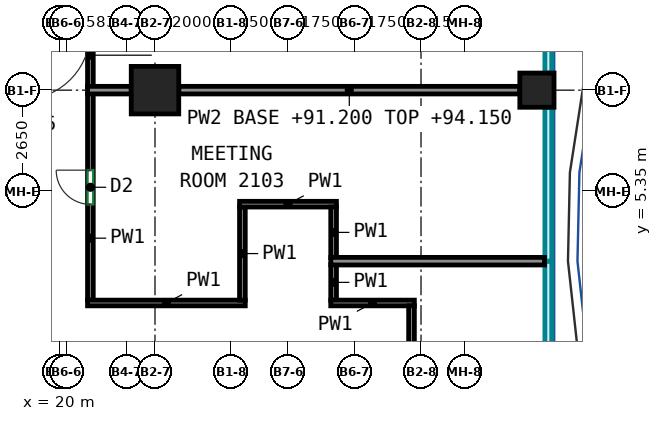
"""IFC4 building model, lengths in metres.
Left out: names, types, materials, properties, quantities, classifications, styles, units other than length and angle.
Written with IfcOpenShell. Run it as: python <this file> out.ifc"""

import sys

from ifc_helpers import new_model, si_unit, direction, frame, frame_2d, origin, origin_2d, place, context, subcontext, project, spatial, rectangle, extrude, source, transform, mapped, element, fill, save


model = new_model("IFC4")
c1 = context("Model", 3, precision=1e-05, world=origin(), true_north=direction((0.0, 1.0)))
c2 = subcontext(c1, "Body", "Model", "MODEL_VIEW")
j1 = project(units=[si_unit("LENGTHUNIT", "METRE"), si_unit("PLANEANGLEUNIT", "RADIAN")], contexts=[c1])
p1 = place(None, origin())
s1 = spatial("IfcSite", under=j1, at=p1, CompositionType="ELEMENT")
p2 = place(p1, origin())
s2 = spatial("IfcBuilding", under=s1, at=p2, CompositionType="ELEMENT")
p3 = place(p2, frame((0.0, 0.0, 91.2)))
s3 = spatial("IfcBuildingStorey", under=s2, at=p3, CompositionType="ELEMENT", Elevation=91.2)
m1 = source(origin(), c2, "Body", "SweptSolid", [
    extrude(rectangle(XDim=1.25, YDim=1.25, at=origin_2d()), origin(), (0.0, 0.0, 1.0), 3.6),
])
p4 = place(p3, frame((22.5, 8.0, 0.0), z_axis=(0.0, 0.0, 1.0), x_axis=(1.0, 0.0, 0.0)))
e1 = element("IfcColumn", 1, at=p4, inside=s3, PredefinedType="COLUMN", context=c2, shape_type="MappedRepresentation", body=[
    mapped(m1, transform((0.0, 0.0, 0.0))),
])
m2 = source(origin(), c2, "Body", "SweptSolid", [
    extrude(rectangle(XDim=0.9, YDim=0.9, at=origin_2d()), origin(), (0.0, 0.0, 1.0), 3.6),
])
p5 = place(p3, frame((32.55, 8.0, 0.0), z_axis=(0.0, 0.0, 1.0), x_axis=(1.0, 0.0, 0.0)))
e2 = element("IfcColumn", 2, at=p5, inside=s3, PredefinedType="COLUMN", context=c2, shape_type="MappedRepresentation", body=[
    mapped(m2, transform((0.0, 0.0, 0.0))),
])
p6 = place(p3, frame((20.8, 8.09, 0.0), z_axis=(0.0, 0.0, 1.0), x_axis=(0.0, 1.0, 0.0)))
e3 = element("IfcWall", 3, at=p6, inside=s3, PredefinedType="PARTITIONING", context=c2, shape_type="SweptSolid", body=[
    extrude(rectangle(XDim=1.66, YDim=0.15, at=frame_2d((0.83, 0.0))), origin(), (0.0, 0.0, 1.0), 3.6),
])
p7 = place(p3, frame((20.8, 2.475, 0.0), z_axis=(0.0, 0.0, 1.0), x_axis=(0.0, 1.0, 0.0)))
e4 = element("IfcWall", 4, at=p7, inside=s3, PredefinedType="PARTITIONING", context=c2, shape_type="SweptSolid", body=[
    extrude(rectangle(XDim=5.435, YDim=0.15, at=frame_2d((2.717, 0.0))), origin(), (0.0, 0.0, 1.0), 3.6),
])
p8 = place(p7, frame((2.52, 0.0, 0.0)))
e5 = element("IfcOpeningElement", 5, at=p8, cuts=e4, PredefinedType="OPENING", context=c2, shape_type="SweptSolid", body=[
    extrude(rectangle(XDim=0.9, YDim=2.1, at=frame_2d((0.45, 1.05))), frame((0.0, 0.085, 0.0), z_axis=(0.0, -1.0, 0.0), x_axis=(1.0, 0.0, 0.0)), (0.0, 0.0, 1.0), 0.17),
])
p9 = place(p3, frame((20.725, 2.4, 0.0), z_axis=(0.0, 0.0, 1.0), x_axis=(1.0, 0.0, 0.0)))
e6 = element("IfcWall", 6, at=p9, inside=s3, PredefinedType="PARTITIONING", context=c2, shape_type="SweptSolid", body=[
    extrude(rectangle(XDim=4.15, YDim=0.15, at=frame_2d((2.075, 0.0))), origin(), (0.0, 0.0, 1.0), 3.6),
])
p10 = place(p3, frame((24.8, 2.475, 0.0), z_axis=(0.0, 0.0, 1.0), x_axis=(0.0, 1.0, 0.0)))
e7 = element("IfcWall", 7, at=p10, inside=s3, PredefinedType="PARTITIONING", context=c2, shape_type="SweptSolid", body=[
    extrude(rectangle(XDim=2.45, YDim=0.15, at=frame_2d((1.225, 0.0))), origin(), (0.0, 0.0, 1.0), 3.6),
])
p11 = place(p3, frame((27.275, 5.0, 0.0), z_axis=(0.0, 0.0, 1.0), x_axis=(-1.0, 0.0, 0.0)))
e8 = element("IfcWall", 8, at=p11, inside=s3, PredefinedType="PARTITIONING", context=c2, shape_type="SweptSolid", body=[
    extrude(rectangle(XDim=2.55, YDim=0.15, at=frame_2d((1.275, 0.0))), origin(), (0.0, 0.0, 1.0), 3.6),
])
p12 = place(p3, frame((27.2, 3.59, 0.0), z_axis=(0.0, 0.0, 1.0), x_axis=(0.0, 1.0, 0.0)))
e9 = element("IfcWall", 9, at=p12, inside=s3, PredefinedType="PARTITIONING", context=c2, shape_type="SweptSolid", body=[
    extrude(rectangle(XDim=1.335, YDim=0.15, at=frame_2d((0.667, 0.0))), origin(), (0.0, 0.0, 1.0), 3.6),
])
p13 = place(p3, frame((27.2, 2.475, 0.0), z_axis=(0.0, 0.0, 1.0), x_axis=(0.0, 1.0, 0.0)))
e10 = element("IfcWall", 10, at=p13, inside=s3, PredefinedType="PARTITIONING", context=c2, shape_type="SweptSolid", body=[
    extrude(rectangle(XDim=0.935, YDim=0.15, at=frame_2d((0.467, 0.0))), origin(), (0.0, 0.0, 1.0), 3.6),
])
p14 = place(p3, frame((27.125, 2.4, 0.0), z_axis=(0.0, 0.0, 1.0), x_axis=(1.0, 0.0, 0.0)))
e11 = element("IfcWall", 11, at=p14, inside=s3, PredefinedType="PARTITIONING", context=c2, shape_type="SweptSolid", body=[
    extrude(rectangle(XDim=2.2, YDim=0.15, at=frame_2d((1.1, 0.0))), origin(), (0.0, 0.0, 1.0), 3.6),
])
p15 = place(p3, frame((29.25, 0.075, 0.0), z_axis=(0.0, 0.0, 1.0), x_axis=(0.0, 1.0, 0.0)))
e12 = element("IfcWall", 12, at=p15, inside=s3, PredefinedType="PARTITIONING", context=c2, shape_type="SweptSolid", body=[
    extrude(rectangle(XDim=2.25, YDim=0.15, at=frame_2d((1.125, 0.0))), origin(), (0.0, 0.0, 1.0), 2.95),
])
p16 = place(p3, frame((23.125, 8.0, 0.0), z_axis=(0.0, 0.0, 1.0), x_axis=(1.0, 0.0, 0.0)))
e13 = element("IfcWall", 13, at=p16, inside=s3, PredefinedType="PARTITIONING", context=c2, shape_type="SweptSolid", body=[
    extrude(rectangle(XDim=8.975, YDim=0.2, at=frame_2d((4.488, 0.0))), origin(), (0.0, 0.0, 1.0), 2.95),
])
p17 = place(p3, frame((20.726, 8.0, 0.0), z_axis=(0.0, 0.0, 1.0), x_axis=(1.0, 0.0, 0.0)))
e14 = element("IfcWall", 14, at=p17, inside=s3, PredefinedType="PARTITIONING", context=c2, shape_type="SweptSolid", body=[
    extrude(rectangle(XDim=1.149, YDim=0.2, at=frame_2d((0.574, 0.0))), origin(), (0.0, 0.0, 1.0), 3.6),
])
p18 = place(p3, frame((27.126, 3.5, 0.0), z_axis=(0.0, 0.0, 1.0), x_axis=(1.0, 0.0, 0.0)))
e15 = element("IfcWall", 15, at=p18, inside=s3, PredefinedType="PARTITIONING", context=c2, shape_type="SweptSolid", body=[
    extrude(rectangle(XDim=5.624, YDim=0.2, at=frame_2d((2.812, 0.0))), origin(), (0.0, 0.0, 1.0), 3.6),
])
p19 = place(p8, origin())
e16 = element("IfcDoor", 16, at=p19, inside=s3, OperationType="SINGLE_SWING_RIGHT", PredefinedType="DOOR", context=c2, shape_type="SweptSolid", body=[
    extrude(rectangle(XDim=0.9, YDim=2.1, at=frame_2d((0.45, 1.05))), frame((0.0, 0.025, 0.0), z_axis=(0.0, -1.0, 0.0), x_axis=(1.0, 0.0, 0.0)), (0.0, 0.0, 1.0), 0.05),
])
fill(e5, e16)
save(model, sys.argv[1])
